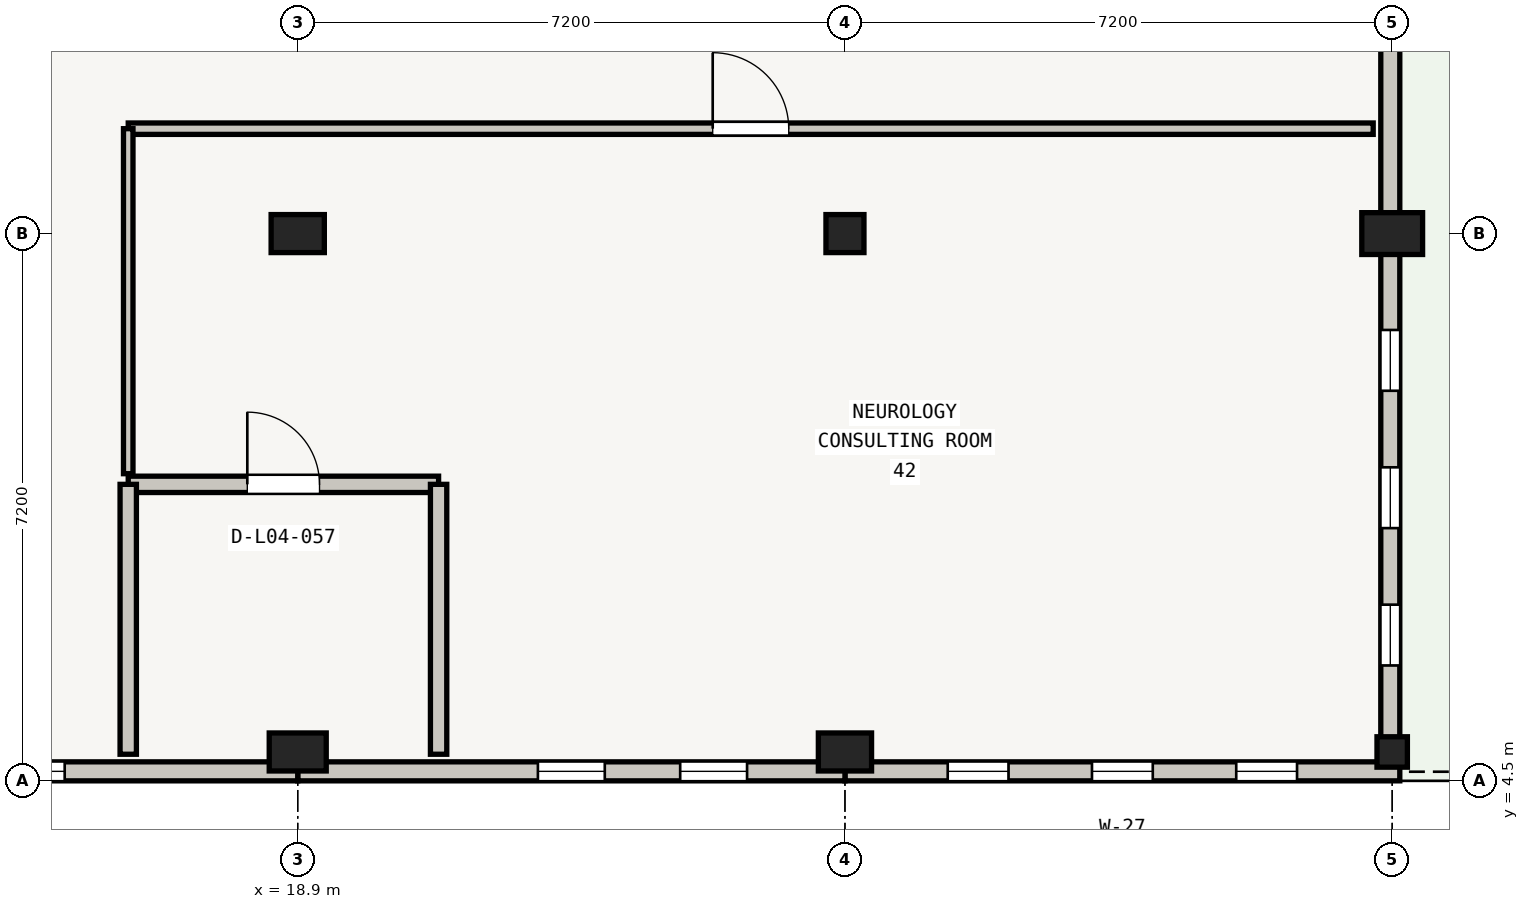
"""IFC4 building model, lengths in metres.
Left out: names, types, materials, properties, quantities, classifications, styles, units other than length and angle.
Written with IfcOpenShell. Run it as: python <this file> out.ifc"""

import sys

from ifc_helpers import new_model, si_unit, direction, frame, frame_2d, origin, origin_2d, place, context, subcontext, project, spatial, rectangle, extrude, element, fill, save


model = new_model("IFC4")
c1 = context("Model", 3, precision=1e-05, world=origin(), true_north=direction((0.0, 1.0)))
c2 = subcontext(c1, "Body", "Model", "MODEL_VIEW")
j1 = project(units=[si_unit("LENGTHUNIT", "METRE"), si_unit("PLANEANGLEUNIT", "RADIAN")], contexts=[c1])
p1 = place(None, origin())
s1 = spatial("IfcSite", under=j1, at=p1, CompositionType="ELEMENT")
p2 = place(p1, origin())
s2 = spatial("IfcBuilding", under=s1, at=p2, CompositionType="ELEMENT")
p3 = place(p2, frame((0.0, 0.0, 17.1)))
s3 = spatial("IfcBuildingStorey", under=s2, at=p3, CompositionType="ELEMENT", Elevation=17.1)
p4 = place(p3, frame((18.9, 4.88, 0.0), z_axis=(0.0, 0.0, 1.0), x_axis=(1.0, 0.0, 0.0)))
e1 = element("IfcColumn", 1, at=p4, inside=s3, PredefinedType="COLUMN", context=c2, shape_type="SweptSolid", body=[
    extrude(rectangle(XDim=0.75, YDim=0.5, at=origin_2d()), origin(), (0.0, 0.0, 1.0), 3.77),
])
for number, where, z_axis, x_axis in (
    (2, (18.9, 11.7, 0.0), (0.0, 0.0, 1.0), (1.0, 0.0, 0.0)),
    (3, (26.1, 4.88, 0.0), (0.0, 0.0, 1.0), (1.0, 0.0, 0.0)),
):
    element("IfcColumn", number, at=place(p3, frame(where, z_axis=z_axis, x_axis=x_axis)), inside=s3, PredefinedType="COLUMN", context=c2, shape_type="SweptSolid", body=[
        extrude(rectangle(XDim=0.7, YDim=0.5, at=origin_2d()), origin(), (0.0, 0.0, 1.0), 3.77),
    ])
p5 = place(p3, frame((26.1, 11.7, 0.0), z_axis=(0.0, 0.0, 1.0), x_axis=(1.0, 0.0, 0.0)))
e4 = element("IfcColumn", 4, at=p5, inside=s3, PredefinedType="COLUMN", context=c2, shape_type="SweptSolid", body=[
    extrude(rectangle(XDim=0.5, YDim=0.5, at=origin_2d()), origin(), (0.0, 0.0, 1.0), 3.77),
])
p6 = place(p3, frame((33.3, 4.88, 0.0), z_axis=(0.0, 0.0, 1.0), x_axis=(1.0, 0.0, 0.0)))
e5 = element("IfcColumn", 5, at=p6, inside=s3, PredefinedType="COLUMN", context=c2, shape_type="SweptSolid", body=[
    extrude(rectangle(XDim=0.4, YDim=0.4, at=origin_2d()), origin(), (0.0, 0.0, 1.0), 3.77),
])
p7 = place(p3, frame((33.3, 11.7, 0.0), z_axis=(0.0, 0.0, 1.0), x_axis=(1.0, 0.0, 0.0)))
e6 = element("IfcColumn", 6, at=p7, inside=s3, PredefinedType="COLUMN", context=c2, shape_type="SweptSolid", body=[
    extrude(rectangle(XDim=0.8, YDim=0.55, at=origin_2d()), origin(), (0.0, 0.0, 1.0), 3.77),
])
p8 = place(p3, frame((33.275, 18.65, 0.0), z_axis=(0.0, 0.0, 1.0), x_axis=(0.0, -1.0, 0.0)))
e7 = element("IfcWall", 7, at=p8, inside=s3, PredefinedType="STANDARD", context=c2, shape_type="SweptSolid", body=[
    extrude(rectangle(XDim=6.95, YDim=0.25, at=frame_2d((3.475, 0.0))), origin(), (0.0, 0.0, 1.0), 3.305),
])
p9 = place(p8, frame((2.9, 0.0, 0.19)))
e8 = element("IfcOpeningElement", 8, at=p9, cuts=e7, PredefinedType="OPENING", context=c2, shape_type="SweptSolid", body=[
    extrude(rectangle(XDim=1.15, YDim=2.02, at=frame_2d((0.575, 1.01))), frame((0.0, 0.125, 0.0), z_axis=(0.0, -1.0, 0.0), x_axis=(1.0, 0.0, 0.0)), (0.0, 0.0, 1.0), 0.25),
])
p10 = place(p3, frame((33.275, 11.7, 0.0), z_axis=(0.0, 0.0, 1.0), x_axis=(0.0, -1.0, 0.0)))
e9 = element("IfcWall", 9, at=p10, inside=s3, PredefinedType="STANDARD", context=c2, shape_type="SweptSolid", body=[
    extrude(rectangle(XDim=6.95, YDim=0.25, at=frame_2d((3.475, 0.0))), origin(), (0.0, 0.0, 1.0), 3.255),
])
p11 = place(p10, frame((1.268, 0.0, 0.55)))
e10 = element("IfcOpeningElement", 10, at=p11, cuts=e9, PredefinedType="OPENING", context=c2, shape_type="SweptSolid", body=[
    extrude(rectangle(XDim=0.8, YDim=2.16, at=frame_2d((0.4, 1.08))), frame((0.0, 0.125, 0.0), z_axis=(0.0, -1.0, 0.0), x_axis=(1.0, 0.0, 0.0)), (0.0, 0.0, 1.0), 0.25),
])
p12 = place(p10, frame((3.075, 0.0, 0.55)))
e11 = element("IfcOpeningElement", 11, at=p12, cuts=e9, PredefinedType="OPENING", context=c2, shape_type="SweptSolid", body=[
    extrude(rectangle(XDim=0.8, YDim=2.16, at=frame_2d((0.4, 1.08))), frame((0.0, 0.125, 0.0), z_axis=(0.0, -1.0, 0.0), x_axis=(1.0, 0.0, 0.0)), (0.0, 0.0, 1.0), 0.25),
])
p13 = place(p10, frame((4.882, 0.0, 0.55)))
e12 = element("IfcOpeningElement", 12, at=p13, cuts=e9, PredefinedType="OPENING", context=c2, shape_type="SweptSolid", body=[
    extrude(rectangle(XDim=0.8, YDim=2.16, at=frame_2d((0.4, 1.08))), frame((0.0, 0.125, 0.0), z_axis=(0.0, -1.0, 0.0), x_axis=(1.0, 0.0, 0.0)), (0.0, 0.0, 1.0), 0.25),
])
p14 = place(p3, frame((33.4, 4.625, 0.0), z_axis=(0.0, 0.0, 1.0), x_axis=(-1.0, 0.0, 0.0)))
e13 = element("IfcWall", 13, at=p14, inside=s3, PredefinedType="STANDARD", context=c2, shape_type="SweptSolid", body=[
    extrude(rectangle(XDim=7.3, YDim=0.25, at=frame_2d((3.65, 0.0))), origin(), (0.0, 0.0, 1.0), 2.805),
])
p15 = place(p14, frame((1.352, 0.0, 0.6)))
e14 = element("IfcOpeningElement", 14, at=p15, cuts=e13, PredefinedType="OPENING", context=c2, shape_type="SweptSolid", body=[
    extrude(rectangle(XDim=0.8, YDim=1.8, at=frame_2d((0.4, 0.9))), frame((0.0, 0.125, 0.0), z_axis=(0.0, -1.0, 0.0), x_axis=(1.0, 0.0, 0.0)), (0.0, 0.0, 1.0), 0.25),
])
p16 = place(p14, frame((3.25, 0.0, 0.6)))
e15 = element("IfcOpeningElement", 15, at=p16, cuts=e13, PredefinedType="OPENING", context=c2, shape_type="SweptSolid", body=[
    extrude(rectangle(XDim=0.8, YDim=1.8, at=frame_2d((0.4, 0.9))), frame((0.0, 0.125, 0.0), z_axis=(0.0, -1.0, 0.0), x_axis=(1.0, 0.0, 0.0)), (0.0, 0.0, 1.0), 0.25),
])
p17 = place(p14, frame((5.148, 0.0, 0.6)))
e16 = element("IfcOpeningElement", 16, at=p17, cuts=e13, PredefinedType="OPENING", context=c2, shape_type="SweptSolid", body=[
    extrude(rectangle(XDim=0.8, YDim=1.8, at=frame_2d((0.4, 0.9))), frame((0.0, 0.125, 0.0), z_axis=(0.0, -1.0, 0.0), x_axis=(1.0, 0.0, 0.0)), (0.0, 0.0, 1.0), 0.25),
])
p18 = place(p3, frame((26.1, 4.625, 0.0), z_axis=(0.0, 0.0, 1.0), x_axis=(-1.0, 0.0, 0.0)))
e17 = element("IfcWall", 17, at=p18, inside=s3, PredefinedType="STANDARD", context=c2, shape_type="SweptSolid", body=[
    extrude(rectangle(XDim=7.2, YDim=0.25, at=frame_2d((3.6, 0.0))), origin(), (0.0, 0.0, 1.0), 2.805),
])
p19 = place(p18, frame((1.288, 0.0, 0.6)))
e18 = element("IfcOpeningElement", 18, at=p19, cuts=e17, PredefinedType="OPENING", context=c2, shape_type="SweptSolid", body=[
    extrude(rectangle(XDim=0.88, YDim=1.8, at=frame_2d((0.44, 0.9))), frame((0.0, 0.125, 0.0), z_axis=(0.0, -1.0, 0.0), x_axis=(1.0, 0.0, 0.0)), (0.0, 0.0, 1.0), 0.25),
])
p20 = place(p18, frame((3.16, 0.0, 0.6)))
e19 = element("IfcOpeningElement", 19, at=p20, cuts=e17, PredefinedType="OPENING", context=c2, shape_type="SweptSolid", body=[
    extrude(rectangle(XDim=0.88, YDim=1.8, at=frame_2d((0.44, 0.9))), frame((0.0, 0.125, 0.0), z_axis=(0.0, -1.0, 0.0), x_axis=(1.0, 0.0, 0.0)), (0.0, 0.0, 1.0), 0.25),
])
p21 = place(p3, frame((18.9, 4.625, 0.0), z_axis=(0.0, 0.0, 1.0), x_axis=(-1.0, 0.0, 0.0)))
e20 = element("IfcWall", 20, at=p21, inside=s3, PredefinedType="STANDARD", context=c2, shape_type="SweptSolid", body=[
    extrude(rectangle(XDim=7.2, YDim=0.25, at=frame_2d((3.6, 0.0))), origin(), (0.0, 0.0, 1.0), 3.155),
])
p22 = place(p21, frame((3.066, 0.0, 0.55)))
e21 = element("IfcOpeningElement", 21, at=p22, cuts=e20, PredefinedType="OPENING", context=c2, shape_type="SweptSolid", body=[
    extrude(rectangle(XDim=0.96, YDim=2.1, at=frame_2d((0.48, 1.05))), frame((0.0, 0.125, 0.0), z_axis=(0.0, -1.0, 0.0), x_axis=(1.0, 0.0, 0.0)), (0.0, 0.0, 1.0), 0.25),
])
p23 = place(p3, frame((16.67, 8.401, 0.0), z_axis=(0.0, 0.0, 1.0), x_axis=(1.0, 0.0, 0.0)))
e22 = element("IfcWall", 22, at=p23, inside=s3, PredefinedType="PLUMBINGWALL", context=c2, shape_type="SweptSolid", body=[
    extrude(rectangle(XDim=4.083, YDim=0.215, at=frame_2d((2.042, 0.0))), origin(), (0.0, 0.0, 1.0), 2.79),
])
p24 = place(p23, frame((1.567, 0.0, 0.0)))
e23 = element("IfcOpeningElement", 23, at=p24, cuts=e22, PredefinedType="OPENING", context=c2, shape_type="SweptSolid", body=[
    extrude(rectangle(XDim=0.95, YDim=2.05, at=frame_2d((0.475, 1.025))), frame((0.0, 0.107, 0.0), z_axis=(0.0, -1.0, 0.0), x_axis=(1.0, 0.0, 0.0)), (0.0, 0.0, 1.0), 0.215),
])
for number, where, z_axis, x_axis in (
    (24, (16.67, 4.85, 0.0), (0.0, 0.0, 1.0), (0.0, 1.0, 0.0)),
    (25, (20.753, 8.401, 0.0), (0.0, 0.0, 1.0), (0.0, -1.0, 0.0)),
):
    element("IfcWall", number, at=place(p3, frame(where, z_axis=z_axis, x_axis=x_axis)), inside=s3, PredefinedType="PLUMBINGWALL", context=c2, shape_type="SweptSolid", body=[
        extrude(rectangle(XDim=3.551, YDim=0.215, at=frame_2d((1.775, 0.0))), origin(), (0.0, 0.0, 1.0), 2.79),
    ])
p25 = place(p3, frame((16.67, 13.08, 0.0), z_axis=(0.0, 0.0, 1.0), x_axis=(1.0, 0.0, 0.0)))
e26 = element("IfcWall", 26, at=p25, inside=s3, PredefinedType="PARTITIONING", context=c2, shape_type="SweptSolid", body=[
    extrude(rectangle(XDim=16.38, YDim=0.15, at=frame_2d((8.19, 0.0))), origin(), (0.0, 0.0, 1.0), 2.79),
])
p26 = place(p25, frame((7.69, 0.0, 0.0)))
e27 = element("IfcOpeningElement", 27, at=p26, cuts=e26, PredefinedType="OPENING", context=c2, shape_type="SweptSolid", body=[
    extrude(rectangle(XDim=1.0, YDim=2.05, at=frame_2d((0.5, 1.025))), frame((0.0, 0.075, 0.0), z_axis=(0.0, -1.0, 0.0), x_axis=(1.0, 0.0, 0.0)), (0.0, 0.0, 1.0), 0.15),
])
p27 = place(p3, frame((16.67, 8.541, 0.0), z_axis=(0.0, 0.0, 1.0), x_axis=(0.0, 1.0, 0.0)))
e28 = element("IfcWall", 28, at=p27, inside=s3, PredefinedType="PARTITIONING", context=c2, shape_type="SweptSolid", body=[
    extrude(rectangle(XDim=4.539, YDim=0.125, at=frame_2d((2.27, 0.0))), origin(), (0.0, 0.0, 1.0), 2.79),
])
p28 = place(p11, origin())
e29 = element("IfcWindow", 29, at=p28, inside=s3, PartitioningType="SINGLE_PANEL", PredefinedType="WINDOW", context=c2, shape_type="SweptSolid", body=[
    extrude(rectangle(XDim=0.8, YDim=2.16, at=frame_2d((0.4, 1.08))), frame((0.0, 0.03, 0.0), z_axis=(0.0, -1.0, 0.0), x_axis=(1.0, 0.0, 0.0)), (0.0, 0.0, 1.0), 0.06),
])
fill(e10, e29)
p29 = place(p12, origin())
e30 = element("IfcWindow", 30, at=p29, inside=s3, PartitioningType="SINGLE_PANEL", PredefinedType="WINDOW", context=c2, shape_type="SweptSolid", body=[
    extrude(rectangle(XDim=0.8, YDim=2.16, at=frame_2d((0.4, 1.08))), frame((0.0, 0.03, 0.0), z_axis=(0.0, -1.0, 0.0), x_axis=(1.0, 0.0, 0.0)), (0.0, 0.0, 1.0), 0.06),
])
fill(e11, e30)
p30 = place(p13, origin())
e31 = element("IfcWindow", 31, at=p30, inside=s3, PartitioningType="SINGLE_PANEL", PredefinedType="WINDOW", context=c2, shape_type="SweptSolid", body=[
    extrude(rectangle(XDim=0.8, YDim=2.16, at=frame_2d((0.4, 1.08))), frame((0.0, 0.03, 0.0), z_axis=(0.0, -1.0, 0.0), x_axis=(1.0, 0.0, 0.0)), (0.0, 0.0, 1.0), 0.06),
])
fill(e12, e31)
p31 = place(p15, origin())
e32 = element("IfcWindow", 32, at=p31, inside=s3, PartitioningType="SINGLE_PANEL", PredefinedType="WINDOW", context=c2, shape_type="SweptSolid", body=[
    extrude(rectangle(XDim=0.8, YDim=1.8, at=frame_2d((0.4, 0.9))), frame((0.0, 0.03, 0.0), z_axis=(0.0, -1.0, 0.0), x_axis=(1.0, 0.0, 0.0)), (0.0, 0.0, 1.0), 0.06),
])
fill(e14, e32)
p32 = place(p16, origin())
e33 = element("IfcWindow", 33, at=p32, inside=s3, PartitioningType="SINGLE_PANEL", PredefinedType="WINDOW", context=c2, shape_type="SweptSolid", body=[
    extrude(rectangle(XDim=0.8, YDim=1.8, at=frame_2d((0.4, 0.9))), frame((0.0, 0.03, 0.0), z_axis=(0.0, -1.0, 0.0), x_axis=(1.0, 0.0, 0.0)), (0.0, 0.0, 1.0), 0.06),
])
fill(e15, e33)
p33 = place(p17, origin())
e34 = element("IfcWindow", 34, at=p33, inside=s3, PartitioningType="SINGLE_PANEL", PredefinedType="WINDOW", context=c2, shape_type="SweptSolid", body=[
    extrude(rectangle(XDim=0.8, YDim=1.8, at=frame_2d((0.4, 0.9))), frame((0.0, 0.03, 0.0), z_axis=(0.0, -1.0, 0.0), x_axis=(1.0, 0.0, 0.0)), (0.0, 0.0, 1.0), 0.06),
])
fill(e16, e34)
p34 = place(p19, origin())
e35 = element("IfcWindow", 35, at=p34, inside=s3, PartitioningType="SINGLE_PANEL", PredefinedType="WINDOW", context=c2, shape_type="SweptSolid", body=[
    extrude(rectangle(XDim=0.88, YDim=1.8, at=frame_2d((0.44, 0.9))), frame((0.0, 0.03, 0.0), z_axis=(0.0, -1.0, 0.0), x_axis=(1.0, 0.0, 0.0)), (0.0, 0.0, 1.0), 0.06),
])
fill(e18, e35)
p35 = place(p20, origin())
e36 = element("IfcWindow", 36, at=p35, inside=s3, PartitioningType="SINGLE_PANEL", PredefinedType="WINDOW", context=c2, shape_type="SweptSolid", body=[
    extrude(rectangle(XDim=0.88, YDim=1.8, at=frame_2d((0.44, 0.9))), frame((0.0, 0.03, 0.0), z_axis=(0.0, -1.0, 0.0), x_axis=(1.0, 0.0, 0.0)), (0.0, 0.0, 1.0), 0.06),
])
fill(e19, e36)
p36 = place(p22, origin())
e37 = element("IfcWindow", 37, at=p36, inside=s3, PartitioningType="DOUBLE_PANEL_VERTICAL", PredefinedType="WINDOW", context=c2, shape_type="SweptSolid", body=[
    extrude(rectangle(XDim=0.96, YDim=2.1, at=frame_2d((0.48, 1.05))), frame((0.0, 0.03, 0.0), z_axis=(0.0, -1.0, 0.0), x_axis=(1.0, 0.0, 0.0)), (0.0, 0.0, 1.0), 0.06),
])
fill(e21, e37)
p37 = place(p24, origin())
e38 = element("IfcDoor", 38, at=p37, inside=s3, OperationType="SINGLE_SWING_LEFT", PredefinedType="DOOR", context=c2, shape_type="SweptSolid", body=[
    extrude(rectangle(XDim=0.95, YDim=2.05, at=frame_2d((0.475, 1.025))), frame((0.0, 0.025, 0.0), z_axis=(0.0, -1.0, 0.0), x_axis=(1.0, 0.0, 0.0)), (0.0, 0.0, 1.0), 0.05),
])
fill(e23, e38)
p38 = place(p26, origin())
e39 = element("IfcDoor", 39, at=p38, inside=s3, OperationType="SINGLE_SWING_LEFT", PredefinedType="DOOR", context=c2, shape_type="SweptSolid", body=[
    extrude(rectangle(XDim=1.0, YDim=2.05, at=frame_2d((0.5, 1.025))), frame((0.0, 0.025, 0.0), z_axis=(0.0, -1.0, 0.0), x_axis=(1.0, 0.0, 0.0)), (0.0, 0.0, 1.0), 0.05),
])
fill(e27, e39)
save(model, sys.argv[1])
